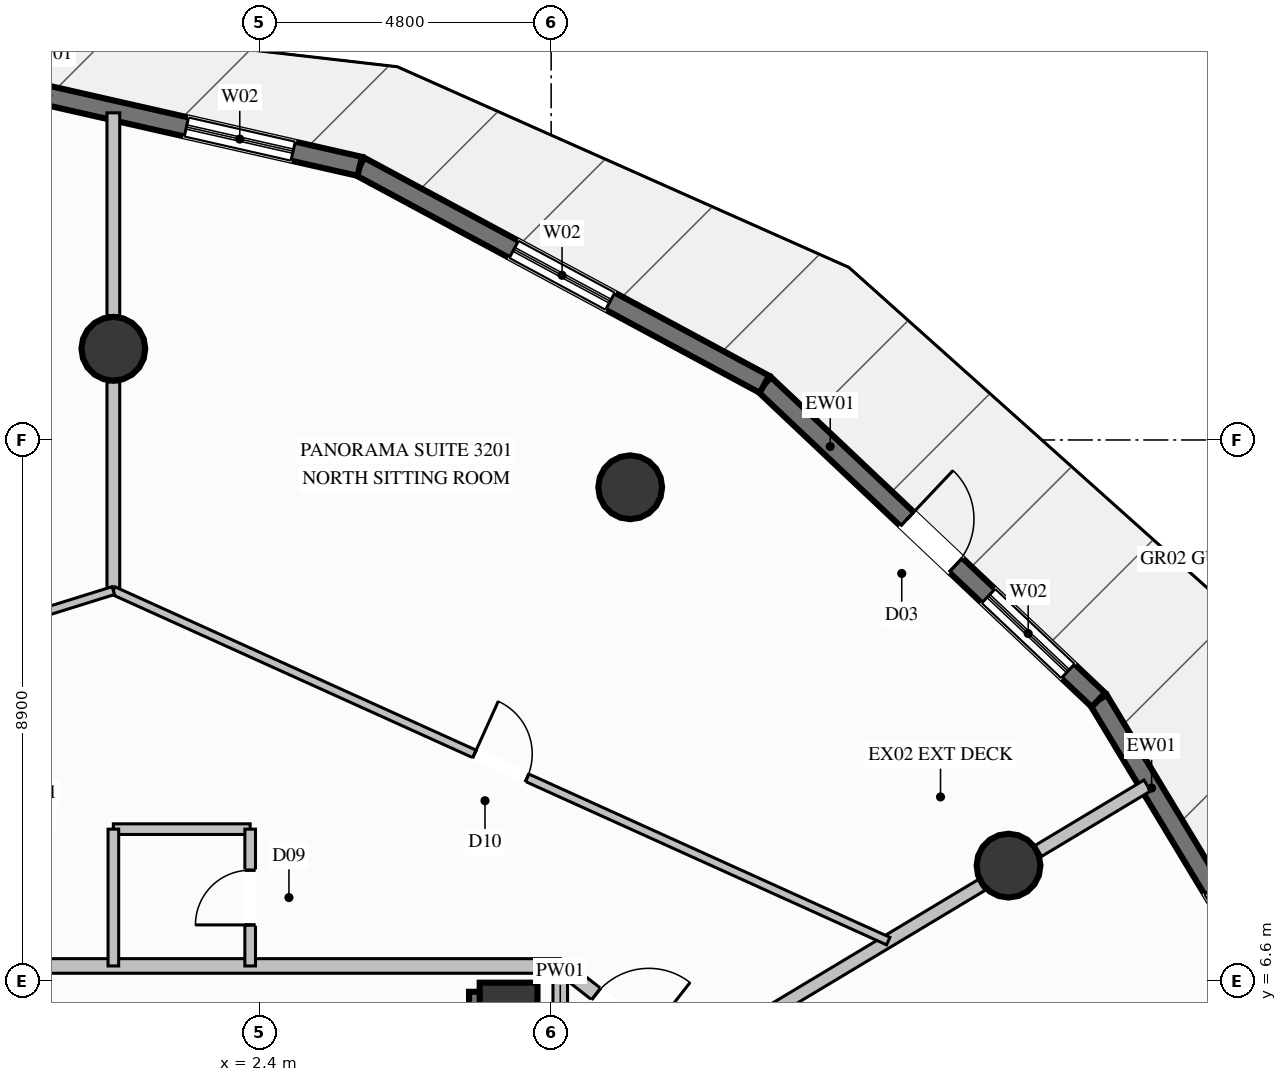
"""IFC4 building model, lengths in metres.
Left out: names, types, materials, properties, quantities, classifications, styles, units other than length and angle.
Written with IfcOpenShell. Run it as: python <this file> out.ifc"""

import sys

from ifc_helpers import new_model, si_unit, direction, frame, frame_2d, origin, origin_2d, place, context, subcontext, project, spatial, rectangle, circle, extrude, element, fill, save


model = new_model("IFC4")
c1 = context("Model", 3, precision=1e-05, world=origin(), true_north=direction((0.0, 1.0)))
c2 = subcontext(c1, "Body", "Model", "MODEL_VIEW")
j1 = project(units=[si_unit("LENGTHUNIT", "METRE"), si_unit("PLANEANGLEUNIT", "RADIAN")], contexts=[c1])
p1 = place(None, origin())
s1 = spatial("IfcSite", under=j1, at=p1, CompositionType="ELEMENT")
p2 = place(p1, origin())
s2 = spatial("IfcBuilding", under=s1, at=p2, CompositionType="ELEMENT")
p3 = place(p2, frame((0.0, 0.0, 120.6)))
s3 = spatial("IfcBuildingStorey", under=s2, at=p3, CompositionType="ELEMENT", Elevation=120.6)
p4 = place(p3, frame((6.5, 6.1, 0.0), z_axis=(0.0, 0.0, 1.0), x_axis=(1.0, 0.0, 0.0)))
e1 = element("IfcColumn", 1, at=p4, inside=s3, PredefinedType="COLUMN", context=c2, shape_type="SweptSolid", body=[
    extrude(rectangle(XDim=0.95, YDim=0.95, at=origin_2d()), origin(), (0.0, 0.0, 1.0), 3.6),
])
p5 = place(p3, frame((5.85, 6.1, 0.0), z_axis=(0.0, 0.0, 1.0), x_axis=(1.0, 0.0, 0.0)))
e2 = element("IfcWall", 2, at=p5, inside=s3, PredefinedType="SHEAR", context=c2, shape_type="SweptSolid", body=[
    extrude(rectangle(XDim=0.325, YDim=0.65, at=frame_2d((0.163, 0.0))), origin(), (0.0, 0.0, 1.0), 3.6),
])
p6 = place(p3, frame((6.5, 3.35, 0.0), z_axis=(0.0, 0.0, 1.0), x_axis=(0.0, 1.0, 0.0)))
e3 = element("IfcWall", 3, at=p6, inside=s3, PredefinedType="SHEAR", context=c2, shape_type="SweptSolid", body=[
    extrude(rectangle(XDim=3.075, YDim=0.65, at=frame_2d((1.538, 0.0))), origin(), (0.0, 0.0, 1.0), 3.6),
])
for number, where, z_axis, x_axis in (
    (4, (14.722, 8.5, 0.0), (0.0, 0.0, 1.0), (1.0, 0.0, 0.0)),
    (5, (8.5, 14.722, 0.0), (0.0, 0.0, 1.0), (1.0, 0.0, 0.0)),
    (6, (0.0, 17.0, 0.0), (0.0, 0.0, 1.0), (1.0, 0.0, 0.0)),
):
    element("IfcColumn", number, at=place(p3, frame(where, z_axis=z_axis, x_axis=x_axis)), inside=s3, PredefinedType="COLUMN", context=c2, shape_type="SweptSolid", body=[
        extrude(circle(Radius=0.525, at=origin_2d()), origin(), (0.0, 0.0, 1.0), 3.6),
    ])
p7 = place(p3, frame((16.201, 11.225, 0.0), z_axis=(0.0, 0.0, 1.0), x_axis=(0.516707807554, -0.856161808079, 0.0)))
e7 = element("IfcWall", 7, at=p7, inside=s3, PredefinedType="SOLIDWALL", context=c2, shape_type="SweptSolid", body=[
    extrude(rectangle(XDim=7.347, YDim=0.32, at=frame_2d((3.673, 0.0))), origin(), (0.0, 0.0, 1.0), 3.35),
])
p8 = place(p7, frame((3.634, 0.0, 0.35)))
e8 = element("IfcOpeningElement", 8, at=p8, cuts=e7, PredefinedType="OPENING", context=c2, shape_type="SweptSolid", body=[
    extrude(rectangle(XDim=1.8, YDim=2.6, at=frame_2d((0.9, 1.3))), frame((0.0, 0.17, 0.0), z_axis=(0.0, -1.0, 0.0), x_axis=(1.0, 0.0, 0.0)), (0.0, 0.0, 1.0), 0.34),
])
p9 = place(p3, frame((10.707, 16.416, 0.0), z_axis=(0.0, 0.0, 1.0), x_axis=(0.726865331795, -0.686780015314, 0.0)))
e9 = element("IfcWall", 9, at=p9, inside=s3, PredefinedType="SOLIDWALL", context=c2, shape_type="SweptSolid", body=[
    extrude(rectangle(XDim=7.558, YDim=0.32, at=frame_2d((3.779, 0.0))), origin(), (0.0, 0.0, 1.0), 3.35),
])
p10 = place(p9, frame((5.069, 0.0, 0.35)))
e10 = element("IfcOpeningElement", 10, at=p10, cuts=e9, PredefinedType="OPENING", context=c2, shape_type="SweptSolid", body=[
    extrude(rectangle(XDim=1.8, YDim=2.6, at=frame_2d((0.9, 1.3))), frame((0.0, 0.17, 0.0), z_axis=(0.0, -1.0, 0.0), x_axis=(1.0, 0.0, 0.0)), (0.0, 0.0, 1.0), 0.34),
])
p11 = place(p9, frame((3.229, 0.0, 0.0)))
e11 = element("IfcOpeningElement", 11, at=p11, cuts=e9, PredefinedType="OPENING", context=c2, shape_type="SweptSolid", body=[
    extrude(rectangle(XDim=1.1, YDim=2.2, at=frame_2d((0.55, 1.1))), frame((0.0, 0.17, 0.0), z_axis=(0.0, -1.0, 0.0), x_axis=(1.0, 0.0, 0.0)), (0.0, 0.0, 1.0), 0.34),
])
p12 = place(p3, frame((4.052, 20.0, 0.0), z_axis=(0.0, 0.0, 1.0), x_axis=(0.880443095894, -0.474151826836, 0.0)))
e12 = element("IfcWall", 12, at=p12, inside=s3, PredefinedType="SOLIDWALL", context=c2, shape_type="SweptSolid", body=[
    extrude(rectangle(XDim=7.559, YDim=0.32, at=frame_2d((3.779, 0.0))), origin(), (0.0, 0.0, 1.0), 3.35),
])
p13 = place(p12, frame((2.879, 0.0, 0.35)))
e13 = element("IfcOpeningElement", 13, at=p13, cuts=e12, PredefinedType="OPENING", context=c2, shape_type="SweptSolid", body=[
    extrude(rectangle(XDim=1.8, YDim=2.6, at=frame_2d((0.9, 1.3))), frame((0.0, 0.17, 0.0), z_axis=(0.0, -1.0, 0.0), x_axis=(1.0, 0.0, 0.0)), (0.0, 0.0, 1.0), 0.34),
])
p14 = place(p3, frame((-3.113, 21.627, 0.0), z_axis=(0.0, 0.0, 1.0), x_axis=(0.975175922812, -0.22143152343, 0.0)))
e14 = element("IfcWall", 14, at=p14, inside=s3, PredefinedType="SOLIDWALL", context=c2, shape_type="SweptSolid", body=[
    extrude(rectangle(XDim=7.347, YDim=0.32, at=frame_2d((3.674, 0.0))), origin(), (0.0, 0.0, 1.0), 3.35),
])
p15 = place(p14, frame((4.424, 0.0, 0.35)))
e15 = element("IfcOpeningElement", 15, at=p15, cuts=e14, PredefinedType="OPENING", context=c2, shape_type="SweptSolid", body=[
    extrude(rectangle(XDim=1.8, YDim=2.6, at=frame_2d((0.9, 1.3))), frame((0.0, 0.17, 0.0), z_axis=(0.0, -1.0, 0.0), x_axis=(1.0, 0.0, 0.0)), (0.0, 0.0, 1.0), 0.34),
])
p16 = place(p3, frame((-7.35, 6.85, 0.0), z_axis=(0.0, 0.0, 1.0), x_axis=(1.0, 0.0, 0.0)))
e16 = element("IfcWall", 16, at=p16, inside=s3, PredefinedType="PARTITIONING", context=c2, shape_type="SweptSolid", body=[
    extrude(rectangle(XDim=14.7, YDim=0.24, at=frame_2d((7.35, 0.0))), origin(), (0.0, 0.0, 1.0), 2.435),
])
p17 = place(p3, frame((7.35, 5.3, 0.0), z_axis=(0.0, 0.0, 1.0), x_axis=(0.0, 1.0, 0.0)))
e17 = element("IfcWall", 17, at=p17, inside=s3, PredefinedType="PARTITIONING", context=c2, shape_type="SweptSolid", body=[
    extrude(rectangle(XDim=1.55, YDim=0.24, at=frame_2d((0.775, 0.0))), origin(), (0.0, 0.0, 1.0), 2.435),
])
p18 = place(p3, frame((9.396, 5.25, 0.0), z_axis=(0.0, 0.0, 1.0), x_axis=(0.857379456535, 0.514684823471, 0.0)))
e18 = element("IfcWall", 18, at=p18, inside=s3, PredefinedType="PARTITIONING", context=c2, shape_type="SweptSolid", body=[
    extrude(rectangle(XDim=5.697, YDim=0.21, at=frame_2d((2.848, 0.0))), origin(), (0.0, 0.0, 1.0), 2.719),
])
p19 = place(p3, frame((15.211, 8.741, 0.0), z_axis=(0.0, 0.0, 1.0), x_axis=(0.857462017951, 0.514547264857, 0.0)))
e19 = element("IfcWall", 19, at=p19, inside=s3, PredefinedType="PARTITIONING", context=c2, shape_type="SweptSolid", body=[
    extrude(rectangle(XDim=2.091, YDim=0.21, at=frame_2d((1.045, 0.0))), origin(), (0.0, 0.0, 1.0), 3.35),
])
for number, where, z_axis, x_axis in (
    (20, (0.0, 9.1, 0.0), (0.0, 0.0, 1.0), (1.0, 0.0, 0.0)),
    (21, (0.0, 9.1, 0.0), (0.0, 0.0, 1.0), (0.0, -1.0, 0.0)),
):
    element("IfcWall", number, at=place(p3, frame(where, z_axis=z_axis, x_axis=x_axis)), inside=s3, PredefinedType="PLUMBINGWALL", context=c2, shape_type="SweptSolid", body=[
        extrude(rectangle(XDim=2.25, YDim=0.175, at=frame_2d((1.125, 0.0))), origin(), (0.0, 0.0, 1.0), 3.35),
    ])
p20 = place(p3, frame((2.25, 6.85, 0.0), z_axis=(0.0, 0.0, 1.0), x_axis=(0.0, 1.0, 0.0)))
e22 = element("IfcWall", 22, at=p20, inside=s3, PredefinedType="PLUMBINGWALL", context=c2, shape_type="SweptSolid", body=[
    extrude(rectangle(XDim=2.25, YDim=0.175, at=frame_2d((1.125, 0.0))), origin(), (0.0, 0.0, 1.0), 3.35),
])
p21 = place(p20, frame((0.675, 0.0, 0.0)))
e23 = element("IfcOpeningElement", 23, at=p21, cuts=e22, PredefinedType="OPENING", context=c2, shape_type="SweptSolid", body=[
    extrude(rectangle(XDim=0.9, YDim=2.1, at=frame_2d((0.45, 1.05))), frame((0.0, 0.098, 0.0), z_axis=(0.0, -1.0, 0.0), x_axis=(1.0, 0.0, 0.0)), (0.0, 0.0, 1.0), 0.195),
])
p22 = place(p3, frame((7.35, 6.85, 0.0), z_axis=(0.0, 0.0, 1.0), x_axis=(0.7876993483, -0.6160598483, 0.0)))
e24 = element("IfcWall", 24, at=p22, inside=s3, PredefinedType="PARTITIONING", context=c2, shape_type="SweptSolid", body=[
    extrude(rectangle(XDim=2.597, YDim=0.24, at=frame_2d((1.299, 0.0))), origin(), (0.0, 0.0, 1.0), 3.35),
])
p23 = place(p22, frame((0.749, 0.0, 0.0)))
e25 = element("IfcOpeningElement", 25, at=p23, cuts=e24, PredefinedType="OPENING", context=c2, shape_type="SweptSolid", body=[
    extrude(rectangle(XDim=1.1, YDim=2.3, at=frame_2d((0.55, 1.15))), frame((0.0, 0.13, 0.0), z_axis=(0.0, -1.0, 0.0), x_axis=(1.0, 0.0, 0.0)), (0.0, 0.0, 1.0), 0.26),
])
p24 = place(p3, frame((0.0, 13.023, 0.0), z_axis=(0.0, 0.0, 1.0), x_axis=(0.0, 1.0, 0.0)))
e26 = element("IfcWall", 26, at=p24, inside=s3, PredefinedType="PARTITIONING", context=c2, shape_type="SweptSolid", body=[
    extrude(rectangle(XDim=3.432, YDim=0.21, at=frame_2d((1.716, 0.0))), origin(), (0.0, 0.0, 1.0), 3.35),
])
p25 = place(p3, frame((0.0, 17.545, 0.0), z_axis=(0.0, 0.0, 1.0), x_axis=(0.0, 1.0, 0.0)))
e27 = element("IfcWall", 27, at=p25, inside=s3, PredefinedType="PARTITIONING", context=c2, shape_type="SweptSolid", body=[
    extrude(rectangle(XDim=3.335, YDim=0.21, at=frame_2d((1.667, 0.0))), origin(), (0.0, 0.0, 1.0), 3.35),
])
p26 = place(p3, frame((0.0, 13.023, 0.0), z_axis=(0.0, 0.0, 1.0), x_axis=(0.911139602209, -0.412097834605, 0.0)))
e28 = element("IfcWall", 28, at=p26, inside=s3, PredefinedType="PARTITIONING", context=c2, shape_type="SweptSolid", body=[
    extrude(rectangle(XDim=13.987, YDim=0.135, at=frame_2d((6.993, 0.0))), origin(), (0.0, 0.0, 1.0), 3.35),
])
p27 = place(p26, frame((6.518, 0.0, 0.0)))
e29 = element("IfcOpeningElement", 29, at=p27, cuts=e28, PredefinedType="OPENING", context=c2, shape_type="SweptSolid", body=[
    extrude(rectangle(XDim=0.95, YDim=2.1, at=frame_2d((0.475, 1.05))), frame((0.0, 0.078, 0.0), z_axis=(0.0, -1.0, 0.0), x_axis=(1.0, 0.0, 0.0)), (0.0, 0.0, 1.0), 0.155),
])
p28 = place(p3, frame((-14.757, 8.422, 0.0), z_axis=(0.0, 0.0, 1.0), x_axis=(0.954677897028, 0.297640912722, 0.0)))
e30 = element("IfcWall", 30, at=p28, inside=s3, PredefinedType="PARTITIONING", context=c2, shape_type="SweptSolid", body=[
    extrude(rectangle(XDim=15.458, YDim=0.135, at=frame_2d((7.729, 0.0))), origin(), (0.0, 0.0, 1.0), 2.878),
])
p29 = place(p28, frame((7.254, 0.0, 0.0)))
e31 = element("IfcOpeningElement", 31, at=p29, cuts=e30, PredefinedType="OPENING", context=c2, shape_type="SweptSolid", body=[
    extrude(rectangle(XDim=0.95, YDim=2.1, at=frame_2d((0.475, 1.05))), frame((0.0, 0.078, 0.0), z_axis=(0.0, -1.0, 0.0), x_axis=(1.0, 0.0, 0.0)), (0.0, 0.0, 1.0), 0.155),
])
p30 = place(p10, origin())
e32 = element("IfcWindow", 32, at=p30, inside=s3, PartitioningType="SINGLE_PANEL", PredefinedType="WINDOW", context=c2, shape_type="SweptSolid", body=[
    extrude(rectangle(XDim=1.8, YDim=2.6, at=frame_2d((0.9, 1.3))), frame((0.0, 0.03, 0.0), z_axis=(0.0, -1.0, 0.0), x_axis=(1.0, 0.0, 0.0)), (0.0, 0.0, 1.0), 0.06),
])
fill(e10, e32)
p31 = place(p11, origin())
e33 = element("IfcDoor", 33, at=p31, inside=s3, OperationType="SINGLE_SWING_LEFT", PredefinedType="DOOR", context=c2, shape_type="SweptSolid", body=[
    extrude(rectangle(XDim=1.1, YDim=2.2, at=frame_2d((0.55, 1.1))), frame((0.0, 0.025, 0.0), z_axis=(0.0, -1.0, 0.0), x_axis=(1.0, 0.0, 0.0)), (0.0, 0.0, 1.0), 0.05),
])
fill(e11, e33)
p32 = place(p13, origin())
e34 = element("IfcWindow", 34, at=p32, inside=s3, PartitioningType="SINGLE_PANEL", PredefinedType="WINDOW", context=c2, shape_type="SweptSolid", body=[
    extrude(rectangle(XDim=1.8, YDim=2.6, at=frame_2d((0.9, 1.3))), frame((0.0, 0.03, 0.0), z_axis=(0.0, -1.0, 0.0), x_axis=(1.0, 0.0, 0.0)), (0.0, 0.0, 1.0), 0.06),
])
fill(e13, e34)
p33 = place(p15, origin())
e35 = element("IfcWindow", 35, at=p33, inside=s3, PartitioningType="SINGLE_PANEL", PredefinedType="WINDOW", context=c2, shape_type="SweptSolid", body=[
    extrude(rectangle(XDim=1.8, YDim=2.6, at=frame_2d((0.9, 1.3))), frame((0.0, 0.03, 0.0), z_axis=(0.0, -1.0, 0.0), x_axis=(1.0, 0.0, 0.0)), (0.0, 0.0, 1.0), 0.06),
])
fill(e15, e35)
p34 = place(p21, origin())
e36 = element("IfcDoor", 36, at=p34, inside=s3, OperationType="SINGLE_SWING_LEFT", PredefinedType="DOOR", context=c2, shape_type="SweptSolid", body=[
    extrude(rectangle(XDim=0.9, YDim=2.1, at=frame_2d((0.45, 1.05))), frame((0.0, 0.025, 0.0), z_axis=(0.0, -1.0, 0.0), x_axis=(1.0, 0.0, 0.0)), (0.0, 0.0, 1.0), 0.05),
])
fill(e23, e36)
p35 = place(p23, origin())
e37 = element("IfcDoor", 37, at=p35, inside=s3, OperationType="SINGLE_SWING_RIGHT", PredefinedType="DOOR", context=c2, shape_type="SweptSolid", body=[
    extrude(rectangle(XDim=1.1, YDim=2.3, at=frame_2d((0.55, 1.15))), frame((0.0, 0.025, 0.0), z_axis=(0.0, -1.0, 0.0), x_axis=(1.0, 0.0, 0.0)), (0.0, 0.0, 1.0), 0.05),
])
fill(e25, e37)
p36 = place(p27, origin())
e38 = element("IfcDoor", 38, at=p36, inside=s3, OperationType="SINGLE_SWING_LEFT", PredefinedType="DOOR", context=c2, shape_type="SweptSolid", body=[
    extrude(rectangle(XDim=0.95, YDim=2.1, at=frame_2d((0.475, 1.05))), frame((0.0, 0.025, 0.0), z_axis=(0.0, -1.0, 0.0), x_axis=(1.0, 0.0, 0.0)), (0.0, 0.0, 1.0), 0.05),
])
fill(e29, e38)
save(model, sys.argv[1])
